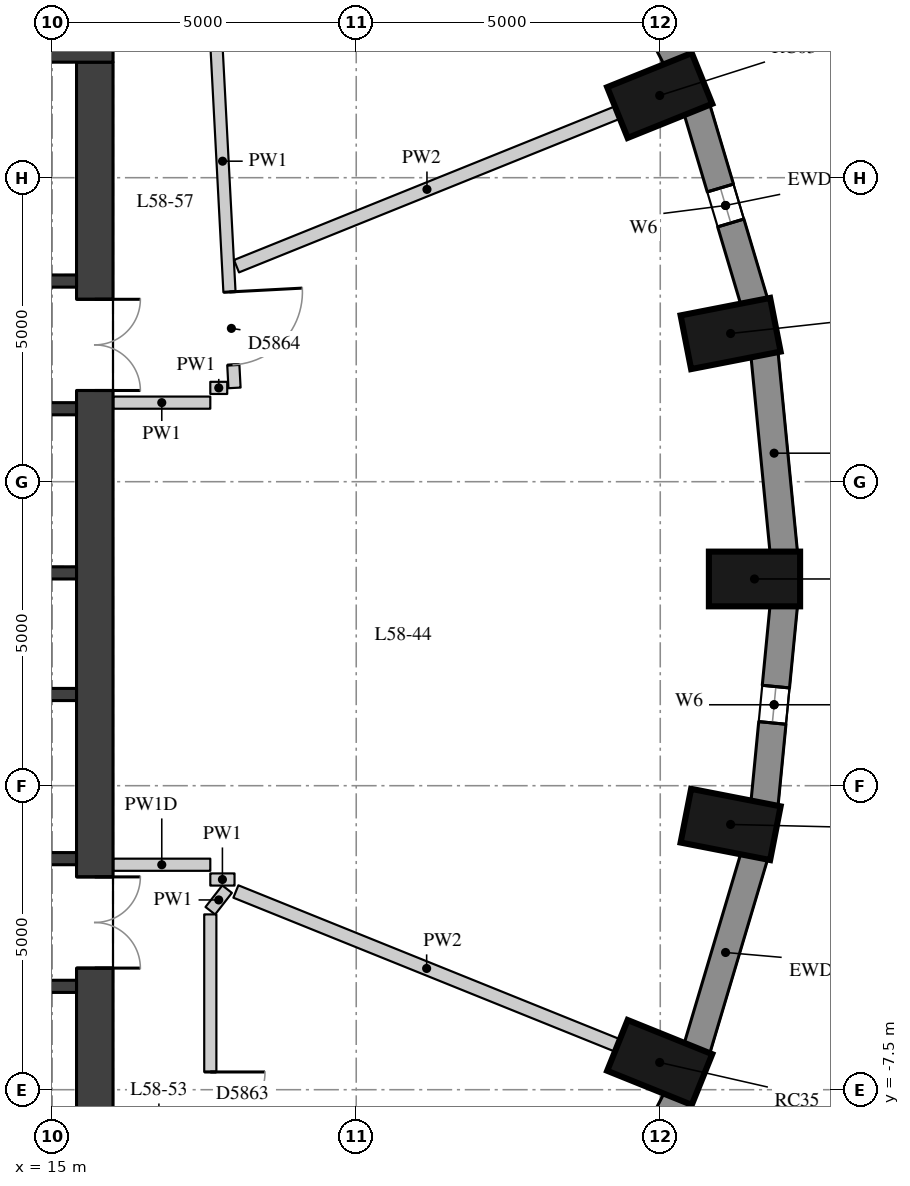
"""IFC4 building model, lengths in metres.
Left out: names, types, materials, properties, quantities, classifications, styles, units other than length and angle.
Written with IfcOpenShell. Run it as: python <this file> out.ifc"""

import sys

from ifc_helpers import new_model, si_unit, direction, frame, frame_2d, origin, origin_2d, place, context, subcontext, project, spatial, rectangle, extrude, element, fill, save


model = new_model("IFC4")
c1 = context("Model", 3, precision=1e-05, world=origin(), true_north=direction((0.0, 1.0)))
c2 = subcontext(c1, "Body", "Model", "MODEL_VIEW")
j1 = project(units=[si_unit("LENGTHUNIT", "METRE"), si_unit("PLANEANGLEUNIT", "RADIAN")], contexts=[c1])
p1 = place(None, origin())
s1 = spatial("IfcSite", under=j1, at=p1, CompositionType="ELEMENT")
p2 = place(p1, origin())
s2 = spatial("IfcBuilding", under=s1, at=p2, CompositionType="ELEMENT")
p3 = place(p2, frame((0.0, 0.0, 205.7)))
s3 = spatial("IfcBuildingStorey", under=s2, at=p3, CompositionType="ELEMENT", Elevation=205.7)
for number, where, z_axis, x_axis in (
    (1, (26.55, 0.9, 0.0), (0.0, 0.0, 1.0), (1.0, 0.0, 0.0)),
    (2, (26.157, 4.937, 0.0), (0.0, 0.0, 1.0), (0.981, 0.192, 0.0)),
    (3, (24.991, 8.852, 0.0), (0.0, 0.0, 1.0), (0.927, 0.374, 0.0)),
    (4, (24.991, -7.052, 0.0), (0.0, 0.0, 1.0), (0.927, -0.374, 0.0)),
    (5, (26.157, -3.137, 0.0), (0.0, 0.0, 1.0), (0.981, -0.192, 0.0)),
):
    element("IfcColumn", number, at=place(p3, frame(where, z_axis=z_axis, x_axis=x_axis)), inside=s3, PredefinedType="COLUMN", context=c2, shape_type="SweptSolid", body=[
        extrude(rectangle(XDim=1.5, YDim=0.9, at=origin_2d()), origin(), (0.0, 0.0, 1.0), 3.3),
    ])
p4 = place(p3, frame((27.032, 1.33, 0.0), z_axis=(0.0, 0.0, 1.0), x_axis=(-0.096824116835, 0.995301507283, 0.0)))
e6 = element("IfcWall", 6, at=p4, inside=s3, PredefinedType="SOLIDWALL", context=c2, shape_type="SweptSolid", body=[
    extrude(rectangle(XDim=3.293, YDim=0.45, at=frame_2d((1.646, 0.0))), origin(), (0.0, 0.0, 1.0), 3.02),
])
p5 = place(p3, frame((26.548, 5.452, 0.0), z_axis=(0.0, 0.0, 1.0), x_axis=(-0.285444972963, 0.958395099847, 0.0)))
e7 = element("IfcWall", 7, at=p5, inside=s3, PredefinedType="SOLIDWALL", context=c2, shape_type="SweptSolid", body=[
    extrude(rectangle(XDim=3.32, YDim=0.45, at=frame_2d((1.66, 0.0))), origin(), (0.0, 0.0, 1.0), 3.02),
])
p6 = place(p5, frame((1.36, 0.0, 0.4)))
e8 = element("IfcOpeningElement", 8, at=p6, cuts=e7, PredefinedType="OPENING", context=c2, shape_type="SweptSolid", body=[
    extrude(rectangle(XDim=0.6, YDim=1.75, at=frame_2d((0.3, 0.875))), frame((0.0, 0.235, 0.0), z_axis=(0.0, -1.0, 0.0), x_axis=(1.0, 0.0, 0.0)), (0.0, 0.0, 1.0), 0.47),
])
p7 = place(p3, frame((25.278, 9.432, 0.0), z_axis=(0.0, 0.0, 1.0), x_axis=(-0.460175500475, 0.887827972505, 0.0)))
e9 = element("IfcWall", 9, at=p7, inside=s3, PredefinedType="SOLIDWALL", context=c2, shape_type="SweptSolid", body=[
    extrude(rectangle(XDim=3.371, YDim=0.45, at=frame_2d((1.685, 0.0))), origin(), (0.0, 0.0, 1.0), 3.02),
])
p8 = place(p3, frame((23.727, -10.624, 0.0), z_axis=(0.0, 0.0, 1.0), x_axis=(0.460175500475, 0.887827972505, 0.0)))
e10 = element("IfcWall", 10, at=p8, inside=s3, PredefinedType="SOLIDWALL", context=c2, shape_type="SweptSolid", body=[
    extrude(rectangle(XDim=3.371, YDim=0.45, at=frame_2d((1.685, 0.0))), origin(), (0.0, 0.0, 1.0), 3.02),
])
p9 = place(p8, frame((1.385, 0.0, 0.4)))
e11 = element("IfcOpeningElement", 11, at=p9, cuts=e10, PredefinedType="OPENING", context=c2, shape_type="SweptSolid", body=[
    extrude(rectangle(XDim=0.6, YDim=1.75, at=frame_2d((0.3, 0.875))), frame((0.0, 0.235, 0.0), z_axis=(0.0, -1.0, 0.0), x_axis=(1.0, 0.0, 0.0)), (0.0, 0.0, 1.0), 0.47),
])
p10 = place(p3, frame((25.6, -6.834, 0.0), z_axis=(0.0, 0.0, 1.0), x_axis=(0.285444972963, 0.958395099847, 0.0)))
e12 = element("IfcWall", 12, at=p10, inside=s3, PredefinedType="SOLIDWALL", context=c2, shape_type="SweptSolid", body=[
    extrude(rectangle(XDim=3.32, YDim=0.45, at=frame_2d((1.66, 0.0))), origin(), (0.0, 0.0, 1.0), 3.02),
])
p11 = place(p3, frame((26.713, -2.808, 0.0), z_axis=(0.0, 0.0, 1.0), x_axis=(0.096816972749, 0.995302202242, 0.0)))
e13 = element("IfcWall", 13, at=p11, inside=s3, PredefinedType="SOLIDWALL", context=c2, shape_type="SweptSolid", body=[
    extrude(rectangle(XDim=3.293, YDim=0.45, at=frame_2d((1.646, 0.0))), origin(), (0.0, 0.0, 1.0), 3.02),
])
p12 = place(p11, frame((1.347, 0.0, 0.4)))
e14 = element("IfcOpeningElement", 14, at=p12, cuts=e13, PredefinedType="OPENING", context=c2, shape_type="SweptSolid", body=[
    extrude(rectangle(XDim=0.6, YDim=1.75, at=frame_2d((0.3, 0.875))), frame((0.0, 0.235, 0.0), z_axis=(0.0, -1.0, 0.0), x_axis=(1.0, 0.0, 0.0)), (0.0, 0.0, 1.0), 0.47),
])
p13 = place(p3, frame((15.7, -9.4, 0.0), z_axis=(0.0, 0.0, 1.0), x_axis=(0.0, 1.0, 0.0)))
e15 = element("IfcWall", 15, at=p13, inside=s3, PredefinedType="SHEAR", context=c2, shape_type="SweptSolid", body=[
    extrude(rectangle(XDim=18.8, YDim=0.6, at=frame_2d((9.4, 0.0))), origin(), (0.0, 0.0, 1.0), 3.02),
])
p14 = place(p13, frame((13.4, 0.0, 0.0)))
e16 = element("IfcOpeningElement", 16, at=p14, cuts=e15, PredefinedType="OPENING", context=c2, shape_type="SweptSolid", body=[
    extrude(rectangle(XDim=1.5, YDim=2.1, at=frame_2d((0.75, 1.05))), frame((0.0, 0.31, 0.0), z_axis=(0.0, -1.0, 0.0), x_axis=(1.0, 0.0, 0.0)), (0.0, 0.0, 1.0), 0.62),
])
p15 = place(p13, frame((3.9, 0.0, 0.0)))
e17 = element("IfcOpeningElement", 17, at=p15, cuts=e15, PredefinedType="OPENING", context=c2, shape_type="SweptSolid", body=[
    extrude(rectangle(XDim=1.5, YDim=2.1, at=frame_2d((0.75, 1.05))), frame((0.0, 0.31, 0.0), z_axis=(0.0, -1.0, 0.0), x_axis=(1.0, 0.0, 0.0)), (0.0, 0.0, 1.0), 0.62),
])
p16 = place(p3, frame((4.0, 9.7, 0.0), z_axis=(0.0, 0.0, 1.0), x_axis=(1.0, 0.0, 0.0)))
e18 = element("IfcWall", 18, at=p16, inside=s3, PredefinedType="SHEAR", context=c2, shape_type="SweptSolid", body=[
    extrude(rectangle(XDim=12.0, YDim=0.6, at=frame_2d((6.0, 0.0))), origin(), (0.0, 0.0, 1.0), 3.02),
])
p17 = place(p3, frame((4.6, 5.8, 0.0), z_axis=(0.0, 0.0, 1.0), x_axis=(1.0, 0.0, 0.0)))
e19 = element("IfcWall", 19, at=p17, inside=s3, PredefinedType="SHEAR", context=c2, shape_type="SweptSolid", body=[
    extrude(rectangle(XDim=10.8, YDim=0.2, at=frame_2d((5.4, 0.0))), origin(), (0.0, 0.0, 1.0), 3.02),
])
p18 = place(p17, frame((7.05, 0.0, 0.0)))
e20 = element("IfcOpeningElement", 20, at=p18, cuts=e19, PredefinedType="OPENING", context=c2, shape_type="SweptSolid", body=[
    extrude(rectangle(XDim=1.1, YDim=2.1, at=frame_2d((0.55, 1.05))), frame((0.0, 0.11, 0.0), z_axis=(0.0, -1.0, 0.0), x_axis=(1.0, 0.0, 0.0)), (0.0, 0.0, 1.0), 0.22),
])
p19 = place(p17, frame((9.05, 0.0, 0.0)))
e21 = element("IfcOpeningElement", 21, at=p19, cuts=e19, PredefinedType="OPENING", context=c2, shape_type="SweptSolid", body=[
    extrude(rectangle(XDim=1.1, YDim=2.1, at=frame_2d((0.55, 1.05))), frame((0.0, 0.11, 0.0), z_axis=(0.0, -1.0, 0.0), x_axis=(1.0, 0.0, 0.0)), (0.0, 0.0, 1.0), 0.22),
])
p20 = place(p3, frame((4.6, 3.7, 0.0), z_axis=(0.0, 0.0, 1.0), x_axis=(1.0, 0.0, 0.0)))
e22 = element("IfcWall", 22, at=p20, inside=s3, PredefinedType="SHEAR", context=c2, shape_type="SweptSolid", body=[
    extrude(rectangle(XDim=10.8, YDim=0.2, at=frame_2d((5.4, 0.0))), origin(), (0.0, 0.0, 1.0), 3.02),
])
p21 = place(p20, frame((6.6, 0.0, 0.0)))
e23 = element("IfcOpeningElement", 23, at=p21, cuts=e22, PredefinedType="OPENING", context=c2, shape_type="SweptSolid", body=[
    extrude(rectangle(XDim=1.1, YDim=2.1, at=frame_2d((0.55, 1.05))), frame((0.0, 0.11, 0.0), z_axis=(0.0, -1.0, 0.0), x_axis=(1.0, 0.0, 0.0)), (0.0, 0.0, 1.0), 0.22),
])
p22 = place(p20, frame((8.9, 0.0, 0.0)))
e24 = element("IfcOpeningElement", 24, at=p22, cuts=e22, PredefinedType="OPENING", context=c2, shape_type="SweptSolid", body=[
    extrude(rectangle(XDim=1.1, YDim=2.1, at=frame_2d((0.55, 1.05))), frame((0.0, 0.11, 0.0), z_axis=(0.0, -1.0, 0.0), x_axis=(1.0, 0.0, 0.0)), (0.0, 0.0, 1.0), 0.22),
])
for number, where, z_axis, x_axis in (
    (25, (4.6, 1.0, 0.0), (0.0, 0.0, 1.0), (1.0, 0.0, 0.0)),
    (26, (4.6, -1.0, 0.0), (0.0, 0.0, 1.0), (1.0, 0.0, 0.0)),
):
    element("IfcWall", number, at=place(p3, frame(where, z_axis=z_axis, x_axis=x_axis)), inside=s3, PredefinedType="SHEAR", context=c2, shape_type="SweptSolid", body=[
        extrude(rectangle(XDim=10.8, YDim=0.2, at=frame_2d((5.4, 0.0))), origin(), (0.0, 0.0, 1.0), 3.02),
    ])
p23 = place(p3, frame((4.6, -3.7, 0.0), z_axis=(0.0, 0.0, 1.0), x_axis=(1.0, 0.0, 0.0)))
e27 = element("IfcWall", 27, at=p23, inside=s3, PredefinedType="SHEAR", context=c2, shape_type="SweptSolid", body=[
    extrude(rectangle(XDim=10.8, YDim=0.2, at=frame_2d((5.4, 0.0))), origin(), (0.0, 0.0, 1.0), 3.02),
])
p24 = place(p23, frame((6.6, 0.0, 0.0)))
e28 = element("IfcOpeningElement", 28, at=p24, cuts=e27, PredefinedType="OPENING", context=c2, shape_type="SweptSolid", body=[
    extrude(rectangle(XDim=1.1, YDim=2.1, at=frame_2d((0.55, 1.05))), frame((0.0, 0.11, 0.0), z_axis=(0.0, -1.0, 0.0), x_axis=(1.0, 0.0, 0.0)), (0.0, 0.0, 1.0), 0.22),
])
p25 = place(p23, frame((8.9, 0.0, 0.0)))
e29 = element("IfcOpeningElement", 29, at=p25, cuts=e27, PredefinedType="OPENING", context=c2, shape_type="SweptSolid", body=[
    extrude(rectangle(XDim=1.1, YDim=2.1, at=frame_2d((0.55, 1.05))), frame((0.0, 0.11, 0.0), z_axis=(0.0, -1.0, 0.0), x_axis=(1.0, 0.0, 0.0)), (0.0, 0.0, 1.0), 0.22),
])
p26 = place(p3, frame((4.6, -5.8, 0.0), z_axis=(0.0, 0.0, 1.0), x_axis=(1.0, 0.0, 0.0)))
e30 = element("IfcWall", 30, at=p26, inside=s3, PredefinedType="SHEAR", context=c2, shape_type="SweptSolid", body=[
    extrude(rectangle(XDim=10.8, YDim=0.2, at=frame_2d((5.4, 0.0))), origin(), (0.0, 0.0, 1.0), 3.02),
])
p27 = place(p3, frame((17.6, -4.043, 0.0), z_axis=(0.0, 0.0, 1.0), x_axis=(1.0, 0.0, 0.0)))
e31 = element("IfcWall", 31, at=p27, inside=s3, PredefinedType="PARTITIONING", context=c2, shape_type="SweptSolid", body=[
    extrude(rectangle(XDim=0.398, YDim=0.2, at=frame_2d((0.199, 0.0))), origin(), (0.0, 0.0, 1.0), 3.02),
])
p28 = place(p3, frame((17.876, -4.201, 0.0), z_axis=(0.0, 0.0, 1.0), x_axis=(-0.61405326993, -0.789264582816, 0.0)))
e32 = element("IfcWall", 32, at=p28, inside=s3, PredefinedType="PARTITIONING", context=c2, shape_type="SweptSolid", body=[
    extrude(rectangle(XDim=0.45, YDim=0.2, at=frame_2d((0.225, 0.0))), origin(), (0.0, 0.0, 1.0), 3.02),
])
p29 = place(p3, frame((17.6, -4.617, 0.0), z_axis=(0.0, 0.0, 1.0), x_axis=(0.0, -1.0, 0.0)))
e33 = element("IfcWall", 33, at=p29, inside=s3, PredefinedType="PARTITIONING", context=c2, shape_type="SweptSolid", body=[
    extrude(rectangle(XDim=6.983, YDim=0.2, at=frame_2d((3.492, 0.0))), origin(), (0.0, 0.0, 1.0), 3.02),
])
p30 = place(p29, frame((2.592, 0.0, 0.0)))
e34 = element("IfcOpeningElement", 34, at=p30, cuts=e33, PredefinedType="OPENING", context=c2, shape_type="SweptSolid", body=[
    extrude(rectangle(XDim=1.8, YDim=2.1, at=frame_2d((0.9, 1.05))), frame((0.0, 0.11, 0.0), z_axis=(0.0, -1.0, 0.0), x_axis=(1.0, 0.0, 0.0)), (0.0, 0.0, 1.0), 0.22),
])
p31 = place(p3, frame((17.605, 11.5, 0.0), z_axis=(0.0, 0.0, 1.0), x_axis=(0.052701255232, -0.998610323248, 0.0)))
e35 = element("IfcWall", 35, at=p31, inside=s3, PredefinedType="PARTITIONING", context=c2, shape_type="SweptSolid", body=[
    extrude(rectangle(XDim=7.468, YDim=0.2, at=frame_2d((3.734, 0.0))), origin(), (0.0, 0.0, 1.0), 3.02),
])
p32 = place(p31, frame((5.887, 0.0, 0.0)))
e36 = element("IfcOpeningElement", 36, at=p32, cuts=e35, PredefinedType="OPENING", context=c2, shape_type="SweptSolid", body=[
    extrude(rectangle(XDim=1.2, YDim=2.1, at=frame_2d((0.6, 1.05))), frame((0.0, 0.11, 0.0), z_axis=(0.0, -1.0, 0.0), x_axis=(1.0, 0.0, 0.0)), (0.0, 0.0, 1.0), 0.22),
])
p33 = place(p3, frame((17.878, 4.043, 0.0), z_axis=(0.0, 0.0, 1.0), x_axis=(-1.0, 0.0, 0.0)))
e37 = element("IfcWall", 37, at=p33, inside=s3, PredefinedType="PARTITIONING", context=c2, shape_type="SweptSolid", body=[
    extrude(rectangle(XDim=0.278, YDim=0.2, at=frame_2d((0.139, 0.0))), origin(), (0.0, 0.0, 1.0), 3.02),
])
p34 = place(p3, frame((17.6, 3.8, 0.0), z_axis=(0.0, 0.0, 1.0), x_axis=(-1.0, 0.0, 0.0)))
e38 = element("IfcWall", 38, at=p34, inside=s3, PredefinedType="PARTITIONING", context=c2, shape_type="SweptSolid", body=[
    extrude(rectangle(XDim=1.596, YDim=0.2, at=frame_2d((0.798, 0.0))), origin(), (0.0, 0.0, 1.0), 3.02),
])
p35 = place(p3, frame((16.004, -3.8, 0.0), z_axis=(0.0, 0.0, 1.0), x_axis=(1.0, 0.0, 0.0)))
e39 = element("IfcWall", 39, at=p35, inside=s3, PredefinedType="PARTITIONING", context=c2, shape_type="SweptSolid", body=[
    extrude(rectangle(XDim=1.596, YDim=0.2, at=frame_2d((0.798, 0.0))), origin(), (0.0, 0.0, 1.0), 2.47),
])
p36 = place(p3, frame((24.295, 8.571, 0.0), z_axis=(0.0, 0.0, 1.0), x_axis=(-0.927395972896, -0.374081153571, 0.0)))
e40 = element("IfcWall", 40, at=p36, inside=s3, PredefinedType="PARTITIONING", context=c2, shape_type="SweptSolid", body=[
    extrude(rectangle(XDim=6.755, YDim=0.22, at=frame_2d((3.377, 0.0))), origin(), (0.0, 0.0, 1.0), 3.02),
])
p37 = place(p3, frame((24.295, -6.771, 0.0), z_axis=(0.0, 0.0, 1.0), x_axis=(-0.927382720906, 0.374114005305, 0.0)))
e41 = element("IfcWall", 41, at=p37, inside=s3, PredefinedType="PARTITIONING", context=c2, shape_type="SweptSolid", body=[
    extrude(rectangle(XDim=6.766, YDim=0.22, at=frame_2d((3.383, 0.0))), origin(), (0.0, 0.0, 1.0), 3.02),
])
p38 = place(p6, origin())
e42 = element("IfcWindow", 42, at=p38, inside=s3, PartitioningType="SINGLE_PANEL", PredefinedType="WINDOW", context=c2, shape_type="SweptSolid", body=[
    extrude(rectangle(XDim=0.6, YDim=1.75, at=frame_2d((0.3, 0.875))), frame((0.0, 0.035, 0.0), z_axis=(0.0, -1.0, 0.0), x_axis=(1.0, 0.0, 0.0)), (0.0, 0.0, 1.0), 0.06),
])
fill(e8, e42)
p39 = place(p12, origin())
e43 = element("IfcWindow", 43, at=p39, inside=s3, PartitioningType="SINGLE_PANEL", PredefinedType="WINDOW", context=c2, shape_type="SweptSolid", body=[
    extrude(rectangle(XDim=0.6, YDim=1.75, at=frame_2d((0.3, 0.875))), frame((0.0, 0.035, 0.0), z_axis=(0.0, -1.0, 0.0), x_axis=(1.0, 0.0, 0.0)), (0.0, 0.0, 1.0), 0.06),
])
fill(e14, e43)
p40 = place(p14, origin())
e44 = element("IfcDoor", 44, at=p40, inside=s3, OperationType="DOUBLE_DOOR_SINGLE_SWING", PredefinedType="DOOR", context=c2, shape_type="SweptSolid", body=[
    extrude(rectangle(XDim=1.5, YDim=2.1, at=frame_2d((0.75, 1.05))), frame((0.0, 0.025, 0.0), z_axis=(0.0, -1.0, 0.0), x_axis=(1.0, 0.0, 0.0)), (0.0, 0.0, 1.0), 0.05),
])
fill(e16, e44)
p41 = place(p15, origin())
e45 = element("IfcDoor", 45, at=p41, inside=s3, OperationType="DOUBLE_DOOR_SINGLE_SWING", PredefinedType="DOOR", context=c2, shape_type="SweptSolid", body=[
    extrude(rectangle(XDim=1.5, YDim=2.1, at=frame_2d((0.75, 1.05))), frame((0.0, 0.025, 0.0), z_axis=(0.0, -1.0, 0.0), x_axis=(1.0, 0.0, 0.0)), (0.0, 0.0, 1.0), 0.05),
])
fill(e17, e45)
p42 = place(p30, origin())
e46 = element("IfcDoor", 46, at=p42, inside=s3, OperationType="DOUBLE_DOOR_SINGLE_SWING", PredefinedType="DOOR", context=c2, shape_type="SweptSolid", body=[
    extrude(rectangle(XDim=1.8, YDim=2.1, at=frame_2d((0.9, 1.05))), frame((0.0, 0.025, 0.0), z_axis=(0.0, -1.0, 0.0), x_axis=(1.0, 0.0, 0.0)), (0.0, 0.0, 1.0), 0.05),
])
fill(e34, e46)
p43 = place(p32, origin())
e47 = element("IfcDoor", 47, at=p43, inside=s3, OperationType="SINGLE_SWING_LEFT", PredefinedType="DOOR", context=c2, shape_type="SweptSolid", body=[
    extrude(rectangle(XDim=1.2, YDim=2.1, at=frame_2d((0.6, 1.05))), frame((0.0, 0.025, 0.0), z_axis=(0.0, -1.0, 0.0), x_axis=(1.0, 0.0, 0.0)), (0.0, 0.0, 1.0), 0.05),
])
fill(e36, e47)
save(model, sys.argv[1])
